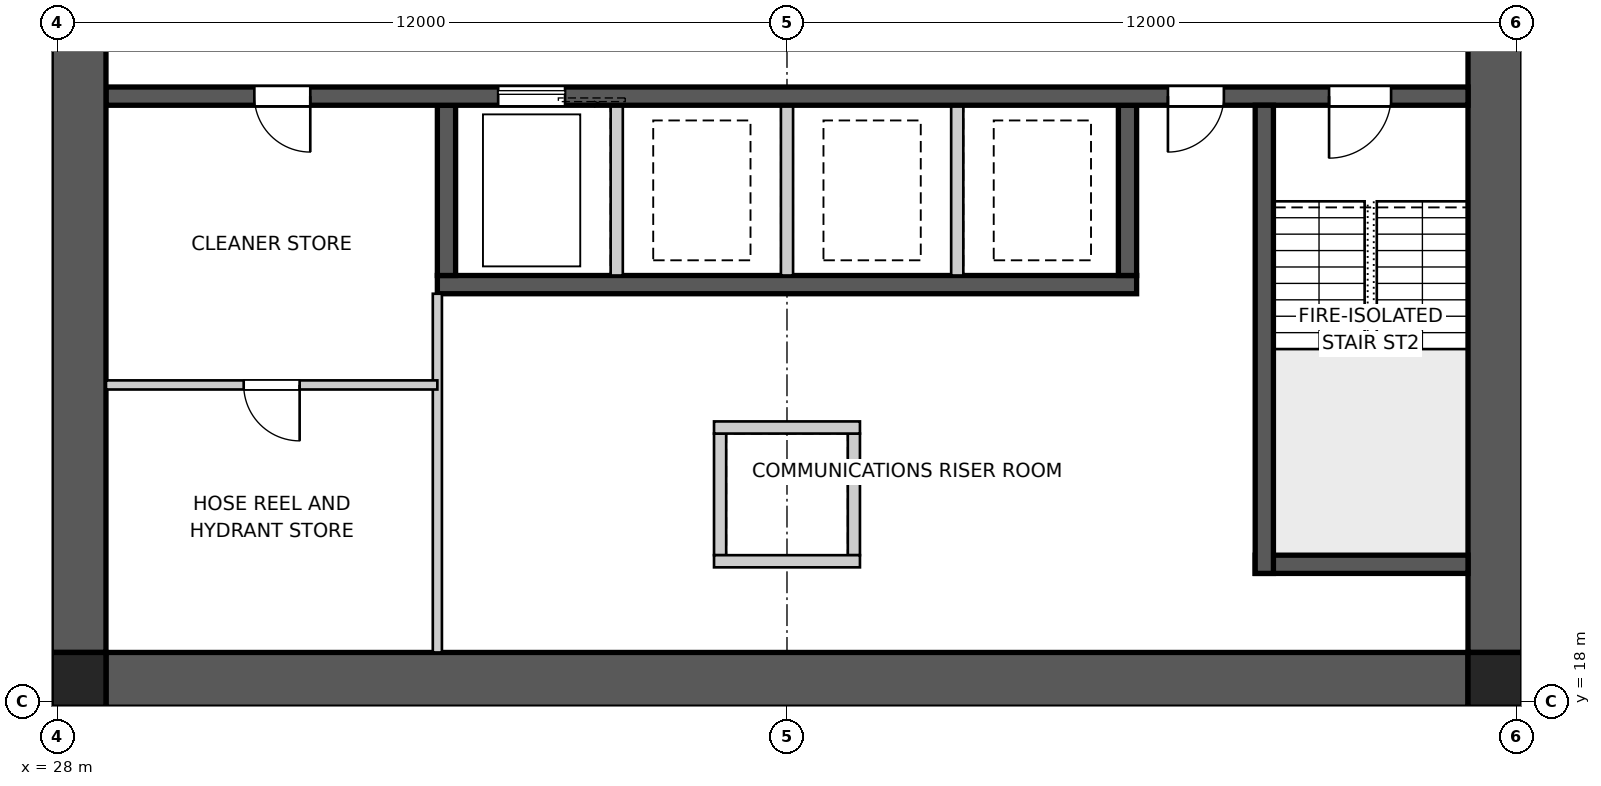
"""IFC4 building model, lengths in metres.
Left out: names, types, materials, properties, quantities, classifications, styles, units other than length and angle.
Written with IfcOpenShell. Run it as: python <this file> out.ifc"""

import sys

from ifc_helpers import new_model, si_unit, direction, frame, frame_2d, origin, origin_2d, place, context, subcontext, project, spatial, polyline, rectangle, outline, extrude, element, fill, save


model = new_model("IFC4")
c1 = context("Model", 3, precision=1e-05, world=origin(), true_north=direction((0.0, 1.0)))
c2 = subcontext(c1, "Body", "Model", "MODEL_VIEW")
j1 = project(units=[si_unit("LENGTHUNIT", "METRE"), si_unit("PLANEANGLEUNIT", "RADIAN")], contexts=[c1])
p1 = place(None, origin())
s1 = spatial("IfcSite", under=j1, at=p1, CompositionType="ELEMENT")
p2 = place(p1, origin())
s2 = spatial("IfcBuilding", under=s1, at=p2, CompositionType="ELEMENT")
p3 = place(p2, frame((0.0, 0.0, 71.0)))
s3 = spatial("IfcBuildingStorey", under=s2, at=p3, CompositionType="ELEMENT", Elevation=71.0)
p4 = place(p3, frame((51.2, 18.35, 0.0), z_axis=(0.0, 0.0, 1.0), x_axis=(-1.0, 0.0, 0.0)))
e1 = element("IfcWall", 1, at=p4, inside=s3, PredefinedType="SHEAR", context=c2, shape_type="SweptSolid", body=[
    extrude(outline(polyline([(0.0, -0.45), (22.4, -0.45), (22.4, -0.025), (22.85, -0.025), (22.85, 0.025), (22.4, 0.025), (22.4, 0.45), (0.0, 0.45), (0.0, 0.025), (-0.45, 0.025), (-0.45, -0.025), (0.0, -0.025), (0.0, -0.45)])), origin(), (0.0, 0.0, 1.0), 3.4),
])
p5 = place(p3, frame((51.65, 18.8, 0.0), z_axis=(0.0, 0.0, 1.0), x_axis=(0.0, 1.0, 0.0)))
e2 = element("IfcWall", 2, at=p5, inside=s3, PredefinedType="SHEAR", context=c2, shape_type="SweptSolid", body=[
    extrude(outline(polyline([(0.0, -0.45), (22.4, -0.45), (22.4, -0.025), (22.85, -0.025), (22.85, 0.025), (22.4, 0.025), (22.4, 0.45), (0.0, 0.45), (0.0, 0.025), (-0.45, 0.025), (-0.45, -0.025), (0.0, -0.025), (0.0, -0.45)])), origin(), (0.0, 0.0, 1.0), 3.4),
])
p6 = place(p5, frame((11.14, 0.0, 0.0)))
e3 = element("IfcOpeningElement", 3, at=p6, cuts=e2, PredefinedType="OPENING", context=c2, shape_type="SweptSolid", body=[
    extrude(rectangle(XDim=1.02, YDim=2.4, at=frame_2d((0.51, 1.2))), frame((0.0, 0.46, 0.0), z_axis=(0.0, -1.0, 0.0), x_axis=(1.0, 0.0, 0.0)), (0.0, 0.0, 1.0), 0.92),
])
p7 = place(p3, frame((28.35, 41.2, 0.0), z_axis=(0.0, 0.0, 1.0), x_axis=(0.0, -1.0, 0.0)))
e4 = element("IfcWall", 4, at=p7, inside=s3, PredefinedType="SHEAR", context=c2, shape_type="SweptSolid", body=[
    extrude(outline(polyline([(0.0, -0.45), (22.4, -0.45), (22.4, -0.025), (22.85, -0.025), (22.85, 0.025), (22.4, 0.025), (22.4, 0.45), (0.0, 0.45), (0.0, 0.025), (-0.45, 0.025), (-0.45, -0.025), (0.0, -0.025), (0.0, -0.45)])), origin(), (0.0, 0.0, 1.0), 3.4),
])
p8 = place(p7, frame((11.14, 0.0, 0.0)))
e5 = element("IfcOpeningElement", 5, at=p8, cuts=e4, PredefinedType="OPENING", context=c2, shape_type="SweptSolid", body=[
    extrude(rectangle(XDim=1.02, YDim=2.4, at=frame_2d((0.51, 1.2))), frame((0.0, 0.46, 0.0), z_axis=(0.0, -1.0, 0.0), x_axis=(1.0, 0.0, 0.0)), (0.0, 0.0, 1.0), 0.92),
])
p9 = place(p3, frame((51.2, 27.95, 0.0), z_axis=(0.0, 0.0, 1.0), x_axis=(-1.0, 0.0, 0.0)))
e6 = element("IfcWall", 6, at=p9, inside=s3, PredefinedType="SHEAR", context=c2, shape_type="SweptSolid", body=[
    extrude(rectangle(XDim=22.4, YDim=0.3, at=frame_2d((11.2, 0.0))), origin(), (0.0, 0.0, 1.0), 3.4),
])
p10 = place(p9, frame((19.04, 0.0, 0.0)))
e7 = element("IfcOpeningElement", 7, at=p10, cuts=e6, PredefinedType="OPENING", context=c2, shape_type="SweptSolid", body=[
    extrude(rectangle(XDim=0.92, YDim=2.1, at=frame_2d((0.46, 1.05))), frame((0.0, 0.16, 0.0), z_axis=(0.0, -1.0, 0.0), x_axis=(1.0, 0.0, 0.0)), (0.0, 0.0, 1.0), 0.32),
])
p11 = place(p9, frame((1.265, 0.0, 0.0)))
e8 = element("IfcOpeningElement", 8, at=p11, cuts=e6, PredefinedType="OPENING", context=c2, shape_type="SweptSolid", body=[
    extrude(rectangle(XDim=1.02, YDim=2.1, at=frame_2d((0.51, 1.05))), frame((0.0, 0.16, 0.0), z_axis=(0.0, -1.0, 0.0), x_axis=(1.0, 0.0, 0.0)), (0.0, 0.0, 1.0), 0.32),
])
p12 = place(p9, frame((4.015, 0.0, 0.0)))
e9 = element("IfcOpeningElement", 9, at=p12, cuts=e6, PredefinedType="OPENING", context=c2, shape_type="SweptSolid", body=[
    extrude(rectangle(XDim=0.92, YDim=2.1, at=frame_2d((0.46, 1.05))), frame((0.0, 0.16, 0.0), z_axis=(0.0, -1.0, 0.0), x_axis=(1.0, 0.0, 0.0)), (0.0, 0.0, 1.0), 0.32),
])
p13 = place(p9, frame((14.85, 0.0, 0.0)))
e10 = element("IfcOpeningElement", 10, at=p13, cuts=e6, PredefinedType="OPENING", context=c2, shape_type="SweptSolid", body=[
    extrude(rectangle(XDim=1.1, YDim=2.1, at=frame_2d((0.55, 1.05))), frame((0.0, 0.16, 0.0), z_axis=(0.0, -1.0, 0.0), x_axis=(1.0, 0.0, 0.0)), (0.0, 0.0, 1.0), 0.32),
])
p14 = place(p3, frame((45.75, 24.85, 0.0), z_axis=(0.0, 0.0, 1.0), x_axis=(-1.0, 0.0, 0.0)))
e11 = element("IfcWall", 11, at=p14, inside=s3, PredefinedType="SHEAR", context=c2, shape_type="SweptSolid", body=[
    extrude(rectangle(XDim=11.5, YDim=0.3, at=frame_2d((5.75, 0.0))), origin(), (0.0, 0.0, 1.0), 3.4),
])
p15 = place(p3, frame((45.6, 27.8, 0.0), z_axis=(0.0, 0.0, 1.0), x_axis=(0.0, -1.0, 0.0)))
e12 = element("IfcWall", 12, at=p15, inside=s3, PredefinedType="SHEAR", context=c2, shape_type="SweptSolid", body=[
    extrude(rectangle(XDim=2.8, YDim=0.3, at=frame_2d((1.4, 0.0))), origin(), (0.0, 0.0, 1.0), 3.4),
])
for number, where, z_axis, x_axis in (
    (13, (42.8, 27.8, 0.0), (0.0, 0.0, 1.0), (0.0, -1.0, 0.0)),
    (14, (40.0, 27.8, 0.0), (0.0, 0.0, 1.0), (0.0, -1.0, 0.0)),
    (15, (37.2, 27.8, 0.0), (0.0, 0.0, 1.0), (0.0, -1.0, 0.0)),
):
    element("IfcWall", number, at=place(p3, frame(where, z_axis=z_axis, x_axis=x_axis)), inside=s3, PredefinedType="SOLIDWALL", context=c2, shape_type="SweptSolid", body=[
        extrude(rectangle(XDim=2.8, YDim=0.2, at=frame_2d((1.4, 0.0))), origin(), (0.0, 0.0, 1.0), 3.4),
    ])
p16 = place(p3, frame((34.4, 27.8, 0.0), z_axis=(0.0, 0.0, 1.0), x_axis=(0.0, -1.0, 0.0)))
e16 = element("IfcWall", 16, at=p16, inside=s3, PredefinedType="SHEAR", context=c2, shape_type="SweptSolid", body=[
    extrude(rectangle(XDim=2.8, YDim=0.3, at=frame_2d((1.4, 0.0))), origin(), (0.0, 0.0, 1.0), 3.4),
])
p17 = place(p3, frame((47.85, 27.8, 0.0), z_axis=(0.0, 0.0, 1.0), x_axis=(0.0, -1.0, 0.0)))
e17 = element("IfcWall", 17, at=p17, inside=s3, PredefinedType="SHEAR", context=c2, shape_type="SweptSolid", body=[
    extrude(rectangle(XDim=7.7, YDim=0.3, at=frame_2d((3.85, 0.0))), origin(), (0.0, 0.0, 1.0), 3.4),
])
p18 = place(p3, frame((51.2, 20.25, 0.0), z_axis=(0.0, 0.0, 1.0), x_axis=(-1.0, 0.0, 0.0)))
e18 = element("IfcWall", 18, at=p18, inside=s3, PredefinedType="SHEAR", context=c2, shape_type="SweptSolid", body=[
    extrude(rectangle(XDim=3.5, YDim=0.3, at=frame_2d((1.75, 0.0))), origin(), (0.0, 0.0, 1.0), 3.4),
])
for number, where, z_axis, x_axis in (
    (19, (38.9, 22.4, 0.0), (0.0, 0.0, 1.0), (0.0, -1.0, 0.0)),
    (20, (41.1, 22.4, 0.0), (0.0, 0.0, 1.0), (0.0, -1.0, 0.0)),
):
    element("IfcWall", number, at=place(p3, frame(where, z_axis=z_axis, x_axis=x_axis)), inside=s3, PredefinedType="SOLIDWALL", context=c2, shape_type="SweptSolid", body=[
        extrude(rectangle(XDim=2.0, YDim=0.2, at=frame_2d((1.0, 0.0))), origin(), (0.0, 0.0, 1.0), 3.4),
    ])
for number, where, z_axis, x_axis in (
    (21, (38.8, 22.5, 0.0), (0.0, 0.0, 1.0), (1.0, 0.0, 0.0)),
    (22, (38.8, 20.3, 0.0), (0.0, 0.0, 1.0), (1.0, 0.0, 0.0)),
):
    element("IfcWall", number, at=place(p3, frame(where, z_axis=z_axis, x_axis=x_axis)), inside=s3, PredefinedType="SOLIDWALL", context=c2, shape_type="SweptSolid", body=[
        extrude(rectangle(XDim=2.4, YDim=0.2, at=frame_2d((1.2, 0.0))), origin(), (0.0, 0.0, 1.0), 3.4),
    ])
for number, where, z_axis, x_axis in (
    (23, (28.35, 18.35, 0.0), (0.0, 0.0, 1.0), (1.0, 0.0, 0.0)),
    (24, (51.65, 18.35, 0.0), (0.0, 0.0, 1.0), (1.0, 0.0, 0.0)),
):
    element("IfcColumn", number, at=place(p3, frame(where, z_axis=z_axis, x_axis=x_axis)), inside=s3, PredefinedType="COLUMN", context=c2, shape_type="SweptSolid", body=[
        extrude(rectangle(XDim=0.9, YDim=0.9, at=origin_2d()), origin(), (0.0, 0.0, 1.0), 3.4),
    ])
p19 = place(p3, frame((34.25, 18.8, 0.0), z_axis=(0.0, 0.0, 1.0), x_axis=(0.0, 1.0, 0.0)))
e25 = element("IfcWall", 25, at=p19, inside=s3, PredefinedType="SOLIDWALL", context=c2, shape_type="SweptSolid", body=[
    extrude(rectangle(XDim=5.9, YDim=0.15, at=frame_2d((2.95, 0.0))), origin(), (0.0, 0.0, 1.0), 3.2),
])
p20 = place(p3, frame((34.25, 23.2, 0.0), z_axis=(0.0, 0.0, 1.0), x_axis=(-1.0, 0.0, 0.0)))
e26 = element("IfcWall", 26, at=p20, inside=s3, PredefinedType="SOLIDWALL", context=c2, shape_type="SweptSolid", body=[
    extrude(rectangle(XDim=5.45, YDim=0.15, at=frame_2d((2.725, 0.0))), origin(), (0.0, 0.0, 1.0), 3.2),
])
p21 = place(p20, frame((2.265, 0.0, 0.0)))
e27 = element("IfcOpeningElement", 27, at=p21, cuts=e26, PredefinedType="OPENING", context=c2, shape_type="SweptSolid", body=[
    extrude(rectangle(XDim=0.92, YDim=2.1, at=frame_2d((0.46, 1.05))), frame((0.0, 0.085, 0.0), z_axis=(0.0, -1.0, 0.0), x_axis=(1.0, 0.0, 0.0)), (0.0, 0.0, 1.0), 0.17),
])
p22 = place(p10, origin())
e28 = element("IfcDoor", 28, at=p22, inside=s3, OperationType="SINGLE_SWING_LEFT", PredefinedType="DOOR", context=c2, shape_type="SweptSolid", body=[
    extrude(rectangle(XDim=0.92, YDim=2.1, at=frame_2d((0.46, 1.05))), frame((0.0, 0.025, 0.0), z_axis=(0.0, -1.0, 0.0), x_axis=(1.0, 0.0, 0.0)), (0.0, 0.0, 1.0), 0.05),
])
fill(e7, e28)
p23 = place(p11, origin())
e29 = element("IfcDoor", 29, at=p23, inside=s3, OperationType="SINGLE_SWING_RIGHT", PredefinedType="DOOR", context=c2, shape_type="SweptSolid", body=[
    extrude(rectangle(XDim=1.02, YDim=2.1, at=frame_2d((0.51, 1.05))), frame((0.0, 0.025, 0.0), z_axis=(0.0, -1.0, 0.0), x_axis=(1.0, 0.0, 0.0)), (0.0, 0.0, 1.0), 0.05),
])
fill(e8, e29)
p24 = place(p12, origin())
e30 = element("IfcDoor", 30, at=p24, inside=s3, OperationType="SINGLE_SWING_RIGHT", PredefinedType="DOOR", context=c2, shape_type="SweptSolid", body=[
    extrude(rectangle(XDim=0.92, YDim=2.1, at=frame_2d((0.46, 1.05))), frame((0.0, 0.025, 0.0), z_axis=(0.0, -1.0, 0.0), x_axis=(1.0, 0.0, 0.0)), (0.0, 0.0, 1.0), 0.05),
])
fill(e9, e30)
p25 = place(p21, origin())
e31 = element("IfcDoor", 31, at=p25, inside=s3, OperationType="SINGLE_SWING_LEFT", PredefinedType="DOOR", context=c2, shape_type="SweptSolid", body=[
    extrude(rectangle(XDim=0.92, YDim=2.1, at=frame_2d((0.46, 1.05))), frame((0.0, 0.025, 0.0), z_axis=(0.0, -1.0, 0.0), x_axis=(1.0, 0.0, 0.0)), (0.0, 0.0, 1.0), 0.05),
])
fill(e27, e31)
p26 = place(p13, origin())
e32 = element("IfcDoor", 32, at=p26, inside=s3, OperationType="SLIDING_TO_LEFT", PredefinedType="DOOR", context=c2, shape_type="SweptSolid", body=[
    extrude(rectangle(XDim=1.1, YDim=2.1, at=frame_2d((0.55, 1.05))), frame((0.0, 0.025, 0.0), z_axis=(0.0, -1.0, 0.0), x_axis=(1.0, 0.0, 0.0)), (0.0, 0.0, 1.0), 0.05),
])
fill(e10, e32)
save(model, sys.argv[1])
